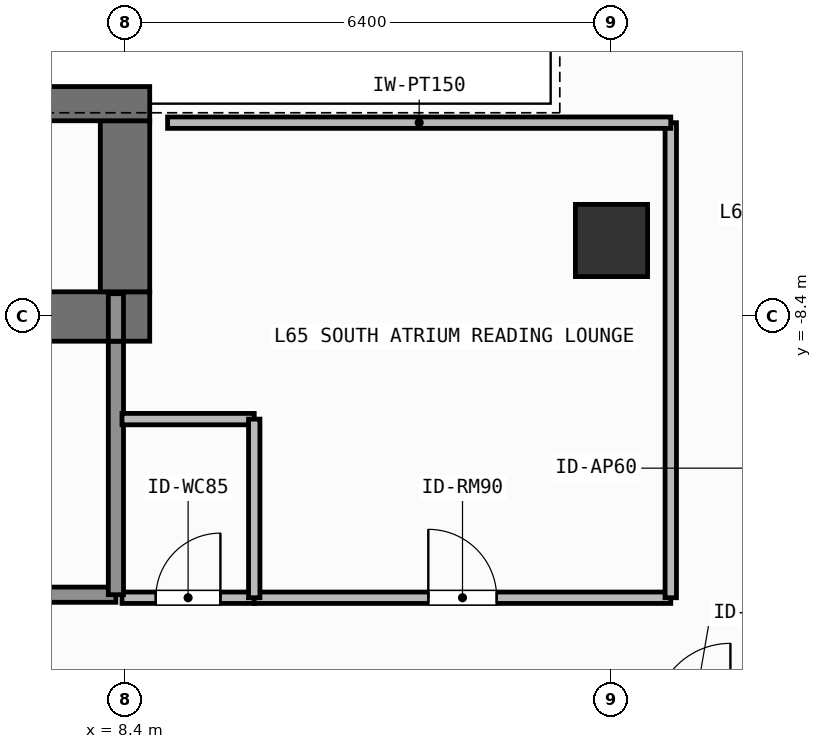
"""IFC4 building model, lengths in metres.
Left out: names, types, materials, properties, quantities, classifications, styles, units other than length and angle.
Written with IfcOpenShell. Run it as: python <this file> out.ifc"""

import sys

from ifc_helpers import new_model, si_unit, direction, frame, frame_2d, origin, origin_2d, place, context, subcontext, project, spatial, rectangle, extrude, element, fill, save


model = new_model("IFC4")
c1 = context("Model", 3, precision=1e-05, world=origin(), true_north=direction((0.0, 1.0)))
c2 = subcontext(c1, "Body", "Model", "MODEL_VIEW")
j1 = project(units=[si_unit("LENGTHUNIT", "METRE"), si_unit("PLANEANGLEUNIT", "RADIAN")], contexts=[c1])
p1 = place(None, origin())
s1 = spatial("IfcSite", under=j1, at=p1, CompositionType="ELEMENT")
p2 = place(p1, origin())
s2 = spatial("IfcBuilding", under=s1, at=p2, CompositionType="ELEMENT")
p3 = place(p2, frame((0.0, 0.0, 266.4)))
s3 = spatial("IfcBuildingStorey", under=s2, at=p3, CompositionType="ELEMENT", Elevation=266.4)
p4 = place(p3, frame((6.12, -8.4, 0.0), z_axis=(0.0, 0.0, 1.0), x_axis=(1.0, 0.0, 0.0)))
e1 = element("IfcWall", 1, at=p4, inside=s3, PredefinedType="SHEAR", context=c2, shape_type="SweptSolid", body=[
    extrude(rectangle(XDim=2.605, YDim=0.65, at=frame_2d((1.302, 0.0))), origin(), (0.0, 0.0, 1.0), 3.9),
])
p5 = place(p3, frame((8.4, -8.075, 0.0), z_axis=(0.0, 0.0, 1.0), x_axis=(0.0, 1.0, 0.0)))
e2 = element("IfcWall", 2, at=p5, inside=s3, PredefinedType="SHEAR", context=c2, shape_type="SweptSolid", body=[
    extrude(rectangle(XDim=2.25, YDim=0.65, at=frame_2d((1.125, 0.0))), origin(), (0.0, 0.0, 1.0), 3.9),
])
p6 = place(p3, frame((3.045, -5.6, 0.0), z_axis=(0.0, 0.0, 1.0), x_axis=(1.0, 0.0, 0.0)))
e3 = element("IfcWall", 3, at=p6, inside=s3, PredefinedType="SHEAR", context=c2, shape_type="SweptSolid", body=[
    extrude(rectangle(XDim=5.68, YDim=0.45, at=frame_2d((2.84, 0.0))), origin(), (0.0, 0.0, 1.0), 3.9),
])
p7 = place(p3, frame((14.8, -7.4, 0.0), z_axis=(0.0, 0.0, 1.0), x_axis=(1.0, 0.0, 0.0)))
e4 = element("IfcColumn", 4, at=p7, inside=s3, PredefinedType="COLUMN", context=c2, shape_type="SweptSolid", body=[
    extrude(rectangle(XDim=0.95, YDim=0.95, at=origin_2d()), origin(), (0.0, 0.0, 1.0), 3.9),
])
p8 = place(p3, frame((4.58, -12.06, 0.0), z_axis=(0.0, 0.0, 1.0), x_axis=(1.0, 0.0, 0.0)))
e5 = element("IfcWall", 5, at=p8, inside=s3, PredefinedType="SOLIDWALL", context=c2, shape_type="SweptSolid", body=[
    extrude(rectangle(XDim=3.7, YDim=0.2, at=frame_2d((1.85, 0.0))), origin(), (0.0, 0.0, 1.0), 3.68),
])
p9 = place(p8, frame((1.212, 0.0, 0.0)))
e6 = element("IfcOpeningElement", 6, at=p9, cuts=e5, PredefinedType="OPENING", context=c2, shape_type="SweptSolid", body=[
    extrude(rectangle(XDim=1.1, YDim=2.15, at=frame_2d((0.55, 1.075))), frame((0.0, 0.11, 0.0), z_axis=(0.0, -1.0, 0.0), x_axis=(1.0, 0.0, 0.0)), (0.0, 0.0, 1.0), 0.22),
])
p10 = place(p3, frame((8.36, -12.1, 0.0), z_axis=(0.0, 0.0, 1.0), x_axis=(1.0, 0.0, 0.0)))
e7 = element("IfcWall", 7, at=p10, inside=s3, PredefinedType="PARTITIONING", context=c2, shape_type="SweptSolid", body=[
    extrude(rectangle(XDim=1.74, YDim=0.15, at=frame_2d((0.87, 0.0))), origin(), (0.0, 0.0, 1.0), 3.68),
])
p11 = place(p10, frame((0.445, 0.0, 0.0)))
e8 = element("IfcOpeningElement", 8, at=p11, cuts=e7, PredefinedType="OPENING", context=c2, shape_type="SweptSolid", body=[
    extrude(rectangle(XDim=0.85, YDim=2.1, at=frame_2d((0.425, 1.05))), frame((0.0, 0.085, 0.0), z_axis=(0.0, -1.0, 0.0), x_axis=(1.0, 0.0, 0.0)), (0.0, 0.0, 1.0), 0.17),
])
p12 = place(p3, frame((10.1, -12.1, 0.0), z_axis=(0.0, 0.0, 1.0), x_axis=(1.0, 0.0, 0.0)))
e9 = element("IfcWall", 9, at=p12, inside=s3, PredefinedType="PARTITIONING", context=c2, shape_type="SweptSolid", body=[
    extrude(rectangle(XDim=5.48, YDim=0.15, at=frame_2d((2.74, 0.0))), origin(), (0.0, 0.0, 1.0), 3.68),
])
p13 = place(p12, frame((2.29, 0.0, 0.0)))
e10 = element("IfcOpeningElement", 10, at=p13, cuts=e9, PredefinedType="OPENING", context=c2, shape_type="SweptSolid", body=[
    extrude(rectangle(XDim=0.9, YDim=2.1, at=frame_2d((0.45, 1.05))), frame((0.0, 0.085, 0.0), z_axis=(0.0, -1.0, 0.0), x_axis=(1.0, 0.0, 0.0)), (0.0, 0.0, 1.0), 0.17),
])
p14 = place(p3, frame((8.28, -12.06, 0.0), z_axis=(0.0, 0.0, 1.0), x_axis=(0.0, 1.0, 0.0)))
e11 = element("IfcWall", 11, at=p14, inside=s3, PredefinedType="SOLIDWALL", context=c2, shape_type="SweptSolid", body=[
    extrude(rectangle(XDim=3.335, YDim=0.2, at=frame_2d((1.667, 0.0))), origin(), (0.0, 0.0, 1.0), 3.68),
])
p15 = place(p3, frame((8.28, -8.725, 0.0), z_axis=(0.0, 0.0, 1.0), x_axis=(0.0, 1.0, 0.0)))
e12 = element("IfcWall", 12, at=p15, inside=s3, PredefinedType="SOLIDWALL", context=c2, shape_type="SweptSolid", body=[
    extrude(rectangle(XDim=0.625, YDim=0.2, at=frame_2d((0.312, 0.0))), origin(), (0.0, 0.0, 1.0), 3.68),
])
p16 = place(p3, frame((8.36, -9.75, 0.0), z_axis=(0.0, 0.0, 1.0), x_axis=(1.0, 0.0, 0.0)))
e13 = element("IfcWall", 13, at=p16, inside=s3, PredefinedType="PARTITIONING", context=c2, shape_type="SweptSolid", body=[
    extrude(rectangle(XDim=1.74, YDim=0.15, at=frame_2d((0.87, 0.0))), origin(), (0.0, 0.0, 1.0), 3.68),
])
p17 = place(p3, frame((10.1, -12.1, 0.0), z_axis=(0.0, 0.0, 1.0), x_axis=(0.0, 1.0, 0.0)))
e14 = element("IfcWall", 14, at=p17, inside=s3, PredefinedType="PARTITIONING", context=c2, shape_type="SweptSolid", body=[
    extrude(rectangle(XDim=2.35, YDim=0.15, at=frame_2d((1.175, 0.0))), origin(), (0.0, 0.0, 1.0), 3.68),
])
p18 = place(p3, frame((15.58, -12.1, 0.0), z_axis=(0.0, 0.0, 1.0), x_axis=(0.0, 1.0, 0.0)))
e15 = element("IfcWall", 15, at=p18, inside=s3, PredefinedType="PARTITIONING", context=c2, shape_type="SweptSolid", body=[
    extrude(rectangle(XDim=6.25, YDim=0.15, at=frame_2d((3.125, 0.0))), origin(), (0.0, 0.0, 1.0), 3.68),
])
p19 = place(p3, frame((8.96, -5.85, 0.0), z_axis=(0.0, 0.0, 1.0), x_axis=(1.0, 0.0, 0.0)))
e16 = element("IfcWall", 16, at=p19, inside=s3, PredefinedType="PARTITIONING", context=c2, shape_type="SweptSolid", body=[
    extrude(rectangle(XDim=6.62, YDim=0.15, at=frame_2d((3.31, 0.0))), origin(), (0.0, 0.0, 1.0), 3.68),
])
p20 = place(p11, origin())
e17 = element("IfcDoor", 17, at=p20, inside=s3, OperationType="SINGLE_SWING_RIGHT", PredefinedType="DOOR", context=c2, shape_type="SweptSolid", body=[
    extrude(rectangle(XDim=0.85, YDim=2.1, at=frame_2d((0.425, 1.05))), frame((0.0, 0.025, 0.0), z_axis=(0.0, -1.0, 0.0), x_axis=(1.0, 0.0, 0.0)), (0.0, 0.0, 1.0), 0.05),
])
fill(e8, e17)
p21 = place(p13, origin())
e18 = element("IfcDoor", 18, at=p21, inside=s3, OperationType="SINGLE_SWING_LEFT", PredefinedType="DOOR", context=c2, shape_type="SweptSolid", body=[
    extrude(rectangle(XDim=0.9, YDim=2.1, at=frame_2d((0.45, 1.05))), frame((0.0, 0.025, 0.0), z_axis=(0.0, -1.0, 0.0), x_axis=(1.0, 0.0, 0.0)), (0.0, 0.0, 1.0), 0.05),
])
fill(e10, e18)
save(model, sys.argv[1])
